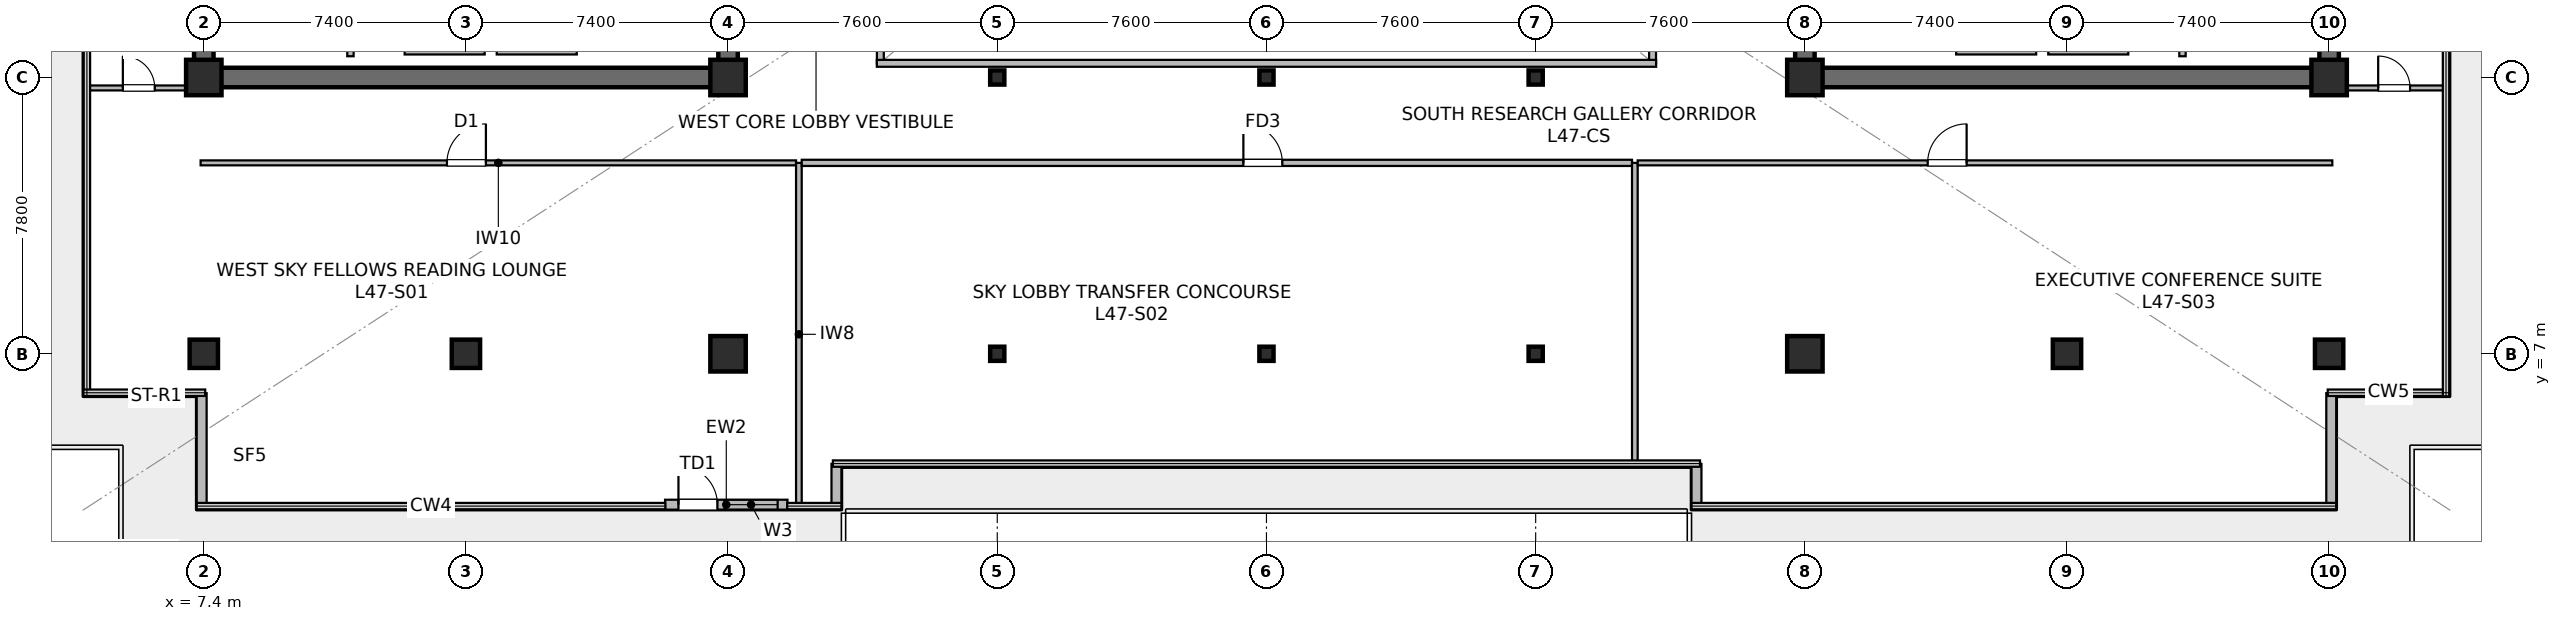
"""IFC4 building model, lengths in metres.
Left out: names, types, materials, properties, quantities, classifications, styles, units other than length and angle.
Written with IfcOpenShell. Run it as: python <this file> out.ifc"""

import sys

from ifc_helpers import new_model, si_unit, direction, frame, frame_2d, origin, origin_2d, place, context, subcontext, project, spatial, rectangle, hollow_rectangle, extrude, source, transform, mapped, element, fill, save


model = new_model("IFC4")
c1 = context("Model", 3, precision=1e-05, world=origin(), true_north=direction((0.0, 1.0)))
c2 = subcontext(c1, "Body", "Model", "MODEL_VIEW")
j1 = project(units=[si_unit("LENGTHUNIT", "METRE"), si_unit("PLANEANGLEUNIT", "RADIAN")], contexts=[c1])
p1 = place(None, origin())
s1 = spatial("IfcSite", under=j1, at=p1, CompositionType="ELEMENT")
p2 = place(p1, origin())
s2 = spatial("IfcBuilding", under=s1, at=p2, CompositionType="ELEMENT")
p3 = place(p2, frame((0.0, 0.0, 196.6)))
s3 = spatial("IfcBuildingStorey", under=s2, at=p3, CompositionType="ELEMENT", Elevation=196.6)
p4 = place(p3, frame((7.125, 14.8, 0.0), z_axis=(0.0, 0.0, 1.0), x_axis=(1.0, 0.0, 0.0)))
e1 = element("IfcWall", 1, at=p4, inside=s3, PredefinedType="SHEAR", context=c2, shape_type="SweptSolid", body=[
    extrude(rectangle(XDim=15.35, YDim=0.55, at=frame_2d((7.675, 0.0))), origin(), (0.0, 0.0, 1.0), 4.5),
])
p5 = place(p3, frame((7.4, 15.075, 0.0), z_axis=(0.0, 0.0, 1.0), x_axis=(0.0, 1.0, 0.0)))
e2 = element("IfcWall", 2, at=p5, inside=s3, PredefinedType="SHEAR", context=c2, shape_type="SweptSolid", body=[
    extrude(rectangle(XDim=18.45, YDim=0.55, at=frame_2d((9.225, 0.0))), origin(), (0.0, 0.0, 1.0), 4.5),
])
p6 = place(p3, frame((22.2, 15.075, 0.0), z_axis=(0.0, 0.0, 1.0), x_axis=(0.0, 1.0, 0.0)))
e3 = element("IfcWall", 3, at=p6, inside=s3, PredefinedType="SHEAR", context=c2, shape_type="SweptSolid", body=[
    extrude(rectangle(XDim=18.45, YDim=0.55, at=frame_2d((9.225, 0.0))), origin(), (0.0, 0.0, 1.0), 4.5),
])
p7 = place(p6, frame((3.475, 0.0, 0.0)))
e4 = element("IfcOpeningElement", 4, at=p7, cuts=e3, PredefinedType="OPENING", context=c2, shape_type="SweptSolid", body=[
    extrude(rectangle(XDim=1.42, YDim=2.2, at=frame_2d((0.71, 1.1))), frame((0.0, 0.285, 0.0), z_axis=(0.0, -1.0, 0.0), x_axis=(1.0, 0.0, 0.0)), (0.0, 0.0, 1.0), 0.57),
])
p8 = place(p3, frame((52.325, 14.8, 0.0), z_axis=(0.0, 0.0, 1.0), x_axis=(1.0, 0.0, 0.0)))
e5 = element("IfcWall", 5, at=p8, inside=s3, PredefinedType="SHEAR", context=c2, shape_type="SweptSolid", body=[
    extrude(rectangle(XDim=15.35, YDim=0.55, at=frame_2d((7.675, 0.0))), origin(), (0.0, 0.0, 1.0), 4.5),
])
p9 = place(p3, frame((52.6, 15.075, 0.0), z_axis=(0.0, 0.0, 1.0), x_axis=(0.0, 1.0, 0.0)))
e6 = element("IfcWall", 6, at=p9, inside=s3, PredefinedType="SHEAR", context=c2, shape_type="SweptSolid", body=[
    extrude(rectangle(XDim=18.45, YDim=0.55, at=frame_2d((9.225, 0.0))), origin(), (0.0, 0.0, 1.0), 4.5),
])
p10 = place(p9, frame((3.475, 0.0, 0.0)))
e7 = element("IfcOpeningElement", 7, at=p10, cuts=e6, PredefinedType="OPENING", context=c2, shape_type="SweptSolid", body=[
    extrude(rectangle(XDim=1.42, YDim=2.2, at=frame_2d((0.71, 1.1))), frame((0.0, 0.285, 0.0), z_axis=(0.0, -1.0, 0.0), x_axis=(1.0, 0.0, 0.0)), (0.0, 0.0, 1.0), 0.57),
])
p11 = place(p3, frame((67.4, 15.075, 0.0), z_axis=(0.0, 0.0, 1.0), x_axis=(0.0, 1.0, 0.0)))
e8 = element("IfcWall", 8, at=p11, inside=s3, PredefinedType="SHEAR", context=c2, shape_type="SweptSolid", body=[
    extrude(rectangle(XDim=18.45, YDim=0.55, at=frame_2d((9.225, 0.0))), origin(), (0.0, 0.0, 1.0), 4.5),
])
m1 = source(origin(), c2, "Body", "SweptSolid", [
    extrude(rectangle(XDim=0.8, YDim=0.8, at=origin_2d()), origin(), (0.0, 0.0, 1.0), 4.8),
])
p12 = place(p3, frame((14.8, 7.0, 0.0), z_axis=(0.0, 0.0, 1.0), x_axis=(1.0, 0.0, 0.0)))
e9 = element("IfcColumn", 9, at=p12, inside=s3, PredefinedType="COLUMN", context=c2, shape_type="MappedRepresentation", body=[
    mapped(m1, transform((0.0, 0.0, 0.0), scale=1.0)),
])
m2 = source(origin(), c2, "Body", "SweptSolid", [
    extrude(rectangle(XDim=1.0, YDim=1.0, at=origin_2d()), origin(), (0.0, 0.0, 1.0), 4.8),
])
for number, where, z_axis, x_axis in (
    (10, (22.2, 7.0, 0.0), (0.0, 0.0, 1.0), (1.0, 0.0, 0.0)),
    (11, (7.4, 14.8, 0.0), (0.0, 0.0, 1.0), (1.0, 0.0, 0.0)),
    (12, (22.2, 14.8, 0.0), (0.0, 0.0, 1.0), (1.0, 0.0, 0.0)),
    (13, (52.6, 7.0, 0.0), (0.0, 0.0, 1.0), (1.0, 0.0, 0.0)),
):
    element("IfcColumn", number, at=place(p3, frame(where, z_axis=z_axis, x_axis=x_axis)), inside=s3, PredefinedType="COLUMN", context=c2, shape_type="MappedRepresentation", body=[
        mapped(m2, transform((0.0, 0.0, 0.0), scale=1.0)),
    ])
p13 = place(p3, frame((60.0, 7.0, 0.0), z_axis=(0.0, 0.0, 1.0), x_axis=(1.0, 0.0, 0.0)))
e14 = element("IfcColumn", 14, at=p13, inside=s3, PredefinedType="COLUMN", context=c2, shape_type="MappedRepresentation", body=[
    mapped(m1, transform((0.0, 0.0, 0.0), scale=1.0)),
])
for number, where, z_axis, x_axis in (
    (15, (52.6, 14.8, 0.0), (0.0, 0.0, 1.0), (1.0, 0.0, 0.0)),
    (16, (67.4, 14.8, 0.0), (0.0, 0.0, 1.0), (1.0, 0.0, 0.0)),
):
    element("IfcColumn", number, at=place(p3, frame(where, z_axis=z_axis, x_axis=x_axis)), inside=s3, PredefinedType="COLUMN", context=c2, shape_type="MappedRepresentation", body=[
        mapped(m2, transform((0.0, 0.0, 0.0), scale=1.0)),
    ])
for number, where, z_axis, x_axis in (
    (17, (7.4, 7.0, 0.0), (0.0, 0.0, 1.0), (1.0, 0.0, 0.0)),
    (18, (67.4, 7.0, 0.0), (0.0, 0.0, 1.0), (1.0, 0.0, 0.0)),
):
    element("IfcColumn", number, at=place(p3, frame(where, z_axis=z_axis, x_axis=x_axis)), inside=s3, PredefinedType="COLUMN", context=c2, shape_type="MappedRepresentation", body=[
        mapped(m1, transform((0.0, 0.0, 0.0), scale=1.0)),
    ])
m3 = source(origin(), c2, "Body", "SweptSolid", [
    extrude(hollow_rectangle(XDim=0.4, YDim=0.4, WallThickness=0.019, at=origin_2d()), origin(), (0.0, 0.0, 1.0), 4.8),
])
for number, where, z_axis, x_axis in (
    (19, (29.8, 7.0, 0.0), (0.0, 0.0, 1.0), (1.0, 0.0, 0.0)),
    (20, (29.8, 14.8, 0.0), (0.0, 0.0, 1.0), (1.0, 0.0, 0.0)),
    (21, (37.4, 7.0, 0.0), (0.0, 0.0, 1.0), (1.0, 0.0, 0.0)),
    (22, (37.4, 14.8, 0.0), (0.0, 0.0, 1.0), (1.0, 0.0, 0.0)),
    (23, (45.0, 7.0, 0.0), (0.0, 0.0, 1.0), (1.0, 0.0, 0.0)),
    (24, (45.0, 14.8, 0.0), (0.0, 0.0, 1.0), (1.0, 0.0, 0.0)),
):
    element("IfcColumn", number, at=place(p3, frame(where, z_axis=z_axis, x_axis=x_axis)), inside=s3, PredefinedType="COLUMN", context=c2, shape_type="MappedRepresentation", body=[
        mapped(m3, transform((0.0, 0.0, 0.0), scale=1.0)),
    ])
p14 = place(p3, frame((20.422, 2.74, 0.0), z_axis=(0.0, 0.0, 1.0), x_axis=(1.0, 0.0, 0.0)))
e25 = element("IfcWall", 25, at=p14, inside=s3, PredefinedType="STANDARD", context=c2, shape_type="SweptSolid", body=[
    extrude(rectangle(XDim=3.456, YDim=0.28, at=frame_2d((1.728, 0.0))), origin(), (0.0, 0.0, 1.0), 4.5),
])
p15 = place(p14, frame((0.378, 0.0, 0.0)))
e26 = element("IfcOpeningElement", 26, at=p15, cuts=e25, PredefinedType="OPENING", context=c2, shape_type="SweptSolid", body=[
    extrude(rectangle(XDim=1.1, YDim=2.2, at=frame_2d((0.55, 1.1))), frame((0.0, 0.15, 0.0), z_axis=(0.0, -1.0, 0.0), x_axis=(1.0, 0.0, 0.0)), (0.0, 0.0, 1.0), 0.3),
])
p16 = place(p14, frame((1.678, 0.0, 0.9)))
e27 = element("IfcOpeningElement", 27, at=p16, cuts=e25, PredefinedType="OPENING", context=c2, shape_type="SweptSolid", body=[
    extrude(rectangle(XDim=1.5, YDim=2.2, at=frame_2d((0.75, 1.1))), frame((0.0, 0.15, 0.0), z_axis=(0.0, -1.0, 0.0), x_axis=(1.0, 0.0, 0.0)), (0.0, 0.0, 1.0), 0.3),
])
for number, where, z_axis, x_axis in (
    (28, (25.26, 2.6, 0.0), (0.0, 0.0, 1.0), (0.0, 1.0, 0.0)),
    (29, (49.54, 3.893, 0.0), (0.0, 0.0, 1.0), (0.0, -1.0, 0.0)),
):
    element("IfcWall", number, at=place(p3, frame(where, z_axis=z_axis, x_axis=x_axis)), inside=s3, PredefinedType="STANDARD", context=c2, shape_type="SweptSolid", body=[
        extrude(rectangle(XDim=1.293, YDim=0.28, at=frame_2d((0.646, 0.0))), origin(), (0.0, 0.0, 1.0), 4.5),
    ])
for number, where, z_axis, x_axis in (
    (30, (67.46, 2.6, 0.0), (0.0, 0.0, 1.0), (0.0, 1.0, 0.0)),
    (31, (7.34, 5.888, 0.0), (0.0, 0.0, 1.0), (0.0, -1.0, 0.0)),
):
    element("IfcWall", number, at=place(p3, frame(where, z_axis=z_axis, x_axis=x_axis)), inside=s3, PredefinedType="STANDARD", context=c2, shape_type="SweptSolid", body=[
        extrude(rectangle(XDim=3.288, YDim=0.28, at=frame_2d((1.644, 0.0))), origin(), (0.0, 0.0, 1.0), 4.5),
    ])
p17 = place(p3, frame((13.07, 15.55, 0.0), z_axis=(0.0, 0.0, 1.0), x_axis=(1.0, 0.0, 0.0)))
e32 = element("IfcWall", 32, at=p17, inside=s3, PredefinedType="SOLIDWALL", context=c2, shape_type="SweptSolid", body=[
    extrude(rectangle(XDim=2.26, YDim=0.2, at=frame_2d((1.13, 0.0))), origin(), (0.0, 0.0, 1.0), 3.897),
])
p18 = place(p3, frame((15.67, 15.55, 0.0), z_axis=(0.0, 0.0, 1.0), x_axis=(1.0, 0.0, 0.0)))
e33 = element("IfcWall", 33, at=p18, inside=s3, PredefinedType="SOLIDWALL", context=c2, shape_type="SweptSolid", body=[
    extrude(rectangle(XDim=2.26, YDim=0.2, at=frame_2d((1.13, 0.0))), origin(), (0.0, 0.0, 1.0), 4.5),
])
p19 = place(p3, frame((11.54, 15.4, 0.0), z_axis=(0.0, 0.0, 1.0), x_axis=(0.0, 1.0, 0.0)))
e34 = element("IfcWall", 34, at=p19, inside=s3, PredefinedType="SOLIDWALL", context=c2, shape_type="SweptSolid", body=[
    extrude(rectangle(XDim=2.4, YDim=0.18, at=frame_2d((1.2, 0.0))), origin(), (0.0, 0.0, 1.0), 4.5),
])
p20 = place(p3, frame((59.47, 15.55, 0.0), z_axis=(0.0, 0.0, 1.0), x_axis=(1.0, 0.0, 0.0)))
e35 = element("IfcWall", 35, at=p20, inside=s3, PredefinedType="SOLIDWALL", context=c2, shape_type="SweptSolid", body=[
    extrude(rectangle(XDim=2.26, YDim=0.2, at=frame_2d((1.13, 0.0))), origin(), (0.0, 0.0, 1.0), 3.897),
])
p21 = place(p3, frame((56.87, 15.55, 0.0), z_axis=(0.0, 0.0, 1.0), x_axis=(1.0, 0.0, 0.0)))
e36 = element("IfcWall", 36, at=p21, inside=s3, PredefinedType="SOLIDWALL", context=c2, shape_type="SweptSolid", body=[
    extrude(rectangle(XDim=2.26, YDim=0.2, at=frame_2d((1.13, 0.0))), origin(), (0.0, 0.0, 1.0), 4.5),
])
p22 = place(p3, frame((63.26, 15.4, 0.0), z_axis=(0.0, 0.0, 1.0), x_axis=(0.0, 1.0, 0.0)))
e37 = element("IfcWall", 37, at=p22, inside=s3, PredefinedType="SOLIDWALL", context=c2, shape_type="SweptSolid", body=[
    extrude(rectangle(XDim=2.4, YDim=0.18, at=frame_2d((1.2, 0.0))), origin(), (0.0, 0.0, 1.0), 4.5),
])
p23 = place(p3, frame((26.5, 15.2, 0.0), z_axis=(0.0, 0.0, 1.0), x_axis=(0.0, 1.0, 0.0)))
e38 = element("IfcWall", 38, at=p23, inside=s3, PredefinedType="SOLIDWALL", context=c2, shape_type="SweptSolid", body=[
    extrude(rectangle(XDim=18.2, YDim=0.195, at=frame_2d((9.1, 0.0))), origin(), (0.0, 0.0, 1.0), 4.5),
])
p24 = place(p23, frame((1.8, 0.0, 0.9)))
e39 = element("IfcOpeningElement", 39, at=p24, cuts=e38, PredefinedType="OPENING", context=c2, shape_type="SweptSolid", body=[
    extrude(rectangle(XDim=1.2, YDim=1.35, at=frame_2d((0.6, 0.675))), frame((0.0, 0.107, 0.0), z_axis=(0.0, -1.0, 0.0), x_axis=(1.0, 0.0, 0.0)), (0.0, 0.0, 1.0), 0.215),
])
p25 = place(p23, frame((13.2, 0.0, 0.9)))
e40 = element("IfcOpeningElement", 40, at=p25, cuts=e38, PredefinedType="OPENING", context=c2, shape_type="SweptSolid", body=[
    extrude(rectangle(XDim=1.2, YDim=1.35, at=frame_2d((0.6, 0.675))), frame((0.0, 0.107, 0.0), z_axis=(0.0, -1.0, 0.0), x_axis=(1.0, 0.0, 0.0)), (0.0, 0.0, 1.0), 0.215),
])
p26 = place(p3, frame((48.3, 15.2, 0.0), z_axis=(0.0, 0.0, 1.0), x_axis=(0.0, 1.0, 0.0)))
e41 = element("IfcWall", 41, at=p26, inside=s3, PredefinedType="SOLIDWALL", context=c2, shape_type="SweptSolid", body=[
    extrude(rectangle(XDim=18.2, YDim=0.195, at=frame_2d((9.1, 0.0))), origin(), (0.0, 0.0, 1.0), 4.5),
])
p27 = place(p26, frame((1.8, 0.0, 0.9)))
e42 = element("IfcOpeningElement", 42, at=p27, cuts=e41, PredefinedType="OPENING", context=c2, shape_type="SweptSolid", body=[
    extrude(rectangle(XDim=1.2, YDim=1.35, at=frame_2d((0.6, 0.675))), frame((0.0, 0.107, 0.0), z_axis=(0.0, -1.0, 0.0), x_axis=(1.0, 0.0, 0.0)), (0.0, 0.0, 1.0), 0.215),
])
p28 = place(p26, frame((13.2, 0.0, 0.9)))
e43 = element("IfcOpeningElement", 43, at=p28, cuts=e41, PredefinedType="OPENING", context=c2, shape_type="SweptSolid", body=[
    extrude(rectangle(XDim=1.2, YDim=1.35, at=frame_2d((0.6, 0.675))), frame((0.0, 0.107, 0.0), z_axis=(0.0, -1.0, 0.0), x_axis=(1.0, 0.0, 0.0)), (0.0, 0.0, 1.0), 0.215),
])
p29 = place(p3, frame((26.4, 15.2, 0.0), z_axis=(0.0, 0.0, 1.0), x_axis=(1.0, 0.0, 0.0)))
e44 = element("IfcWall", 44, at=p29, inside=s3, PredefinedType="SOLIDWALL", context=c2, shape_type="SweptSolid", body=[
    extrude(rectangle(XDim=22.0, YDim=0.195, at=frame_2d((11.0, 0.0))), origin(), (0.0, 0.0, 1.0), 4.5),
])
p30 = place(p3, frame((7.31, 12.39, 0.0), z_axis=(0.0, 0.0, 1.0), x_axis=(1.0, 0.0, 0.0)))
e45 = element("IfcWall", 45, at=p30, inside=s3, PredefinedType="PARTITIONING", context=c2, shape_type="SweptSolid", body=[
    extrude(rectangle(XDim=16.81, YDim=0.14, at=frame_2d((8.405, 0.0))), origin(), (0.0, 0.0, 1.0), 3.897),
])
p31 = place(p30, frame((6.954, 0.0, 0.0)))
e46 = element("IfcOpeningElement", 46, at=p31, cuts=e45, PredefinedType="OPENING", context=c2, shape_type="SweptSolid", body=[
    extrude(rectangle(XDim=1.1, YDim=2.18, at=frame_2d((0.55, 1.09))), frame((0.0, 0.08, 0.0), z_axis=(0.0, -1.0, 0.0), x_axis=(1.0, 0.0, 0.0)), (0.0, 0.0, 1.0), 0.16),
])
p32 = place(p3, frame((24.2, 2.71, 0.0), z_axis=(0.0, 0.0, 1.0), x_axis=(0.0, 1.0, 0.0)))
e47 = element("IfcWall", 47, at=p32, inside=s3, PredefinedType="PARTITIONING", context=c2, shape_type="SweptSolid", body=[
    extrude(rectangle(XDim=9.68, YDim=0.16, at=frame_2d((4.84, 0.0))), origin(), (0.0, 0.0, 1.0), 3.835),
])
p33 = place(p3, frame((24.28, 12.39, 0.0), z_axis=(0.0, 0.0, 1.0), x_axis=(1.0, 0.0, 0.0)))
e48 = element("IfcWall", 48, at=p33, inside=s3, PredefinedType="PARTITIONING", context=c2, shape_type="SweptSolid", body=[
    extrude(rectangle(XDim=23.44, YDim=0.175, at=frame_2d((11.72, 0.0))), origin(), (0.0, 0.0, 1.0), 3.897),
])
p34 = place(p33, frame((12.469, 0.0, 0.0)))
e49 = element("IfcOpeningElement", 49, at=p34, cuts=e48, PredefinedType="OPENING", context=c2, shape_type="SweptSolid", body=[
    extrude(rectangle(XDim=1.1, YDim=2.15, at=frame_2d((0.55, 1.075))), frame((0.0, 0.098, 0.0), z_axis=(0.0, -1.0, 0.0), x_axis=(1.0, 0.0, 0.0)), (0.0, 0.0, 1.0), 0.195),
])
p35 = place(p3, frame((47.8, 3.91, 0.0), z_axis=(0.0, 0.0, 1.0), x_axis=(0.0, 1.0, 0.0)))
e50 = element("IfcWall", 50, at=p35, inside=s3, PredefinedType="PARTITIONING", context=c2, shape_type="SweptSolid", body=[
    extrude(rectangle(XDim=8.48, YDim=0.16, at=frame_2d((4.24, 0.0))), origin(), (0.0, 0.0, 1.0), 3.835),
])
p36 = place(p3, frame((47.88, 12.39, 0.0), z_axis=(0.0, 0.0, 1.0), x_axis=(1.0, 0.0, 0.0)))
e51 = element("IfcWall", 51, at=p36, inside=s3, PredefinedType="PARTITIONING", context=c2, shape_type="SweptSolid", body=[
    extrude(rectangle(XDim=19.61, YDim=0.14, at=frame_2d((9.805, 0.0))), origin(), (0.0, 0.0, 1.0), 3.897),
])
p37 = place(p36, frame((8.186, 0.0, 0.0)))
e52 = element("IfcOpeningElement", 52, at=p37, cuts=e51, PredefinedType="OPENING", context=c2, shape_type="SweptSolid", body=[
    extrude(rectangle(XDim=1.1, YDim=2.18, at=frame_2d((0.55, 1.09))), frame((0.0, 0.08, 0.0), z_axis=(0.0, -1.0, 0.0), x_axis=(1.0, 0.0, 0.0)), (0.0, 0.0, 1.0), 0.16),
])
p38 = place(p3, frame((4.11, 14.505, 0.0), z_axis=(0.0, 0.0, 1.0), x_axis=(1.0, 0.0, 0.0)))
e53 = element("IfcWall", 53, at=p38, inside=s3, PredefinedType="PARTITIONING", context=c2, shape_type="SweptSolid", body=[
    extrude(rectangle(XDim=2.91, YDim=0.14, at=frame_2d((1.455, 0.0))), origin(), (0.0, 0.0, 1.0), 4.5),
])
p39 = place(p38, frame((1.005, 0.0, 0.0)))
e54 = element("IfcOpeningElement", 54, at=p39, cuts=e53, PredefinedType="OPENING", context=c2, shape_type="SweptSolid", body=[
    extrude(rectangle(XDim=0.9, YDim=2.1, at=frame_2d((0.45, 1.05))), frame((0.0, 0.08, 0.0), z_axis=(0.0, -1.0, 0.0), x_axis=(1.0, 0.0, 0.0)), (0.0, 0.0, 1.0), 0.16),
])
p40 = place(p3, frame((67.78, 14.505, 0.0), z_axis=(0.0, 0.0, 1.0), x_axis=(1.0, 0.0, 0.0)))
e55 = element("IfcWall", 55, at=p40, inside=s3, PredefinedType="PARTITIONING", context=c2, shape_type="SweptSolid", body=[
    extrude(rectangle(XDim=2.91, YDim=0.14, at=frame_2d((1.455, 0.0))), origin(), (0.0, 0.0, 1.0), 4.5),
])
p41 = place(p40, frame((1.005, 0.0, 0.0)))
e56 = element("IfcOpeningElement", 56, at=p41, cuts=e55, PredefinedType="OPENING", context=c2, shape_type="SweptSolid", body=[
    extrude(rectangle(XDim=0.9, YDim=2.1, at=frame_2d((0.45, 1.05))), frame((0.0, 0.08, 0.0), z_axis=(0.0, -1.0, 0.0), x_axis=(1.0, 0.0, 0.0)), (0.0, 0.0, 1.0), 0.16),
])
m4 = source(origin(), c2, "Body", "SweptSolid", [
    extrude(rectangle(XDim=1.1, YDim=2.2, at=frame_2d((0.55, 1.1))), frame((0.0, 0.025, 0.0), z_axis=(0.0, -1.0, 0.0), x_axis=(1.0, 0.0, 0.0)), (0.0, 0.0, 1.0), 0.05),
])
p42 = place(p15, origin())
e57 = element("IfcDoor", 57, at=p42, inside=s3, OperationType="SINGLE_SWING_LEFT", PredefinedType="DOOR", context=c2, shape_type="MappedRepresentation", body=[
    mapped(m4, transform((0.0, 0.0, 0.0), scale=1.0)),
])
fill(e26, e57)
m5 = source(origin(), c2, "Body", "SweptSolid", [
    extrude(rectangle(XDim=1.5, YDim=2.2, at=frame_2d((0.75, 1.1))), frame((0.0, 0.03, 0.0), z_axis=(0.0, -1.0, 0.0), x_axis=(1.0, 0.0, 0.0)), (0.0, 0.0, 1.0), 0.06),
])
p43 = place(p16, origin())
e58 = element("IfcWindow", 58, at=p43, inside=s3, PartitioningType="SINGLE_PANEL", PredefinedType="WINDOW", context=c2, shape_type="MappedRepresentation", body=[
    mapped(m5, transform((0.0, 0.0, 0.0), scale=1.0)),
])
fill(e27, e58)
m6 = source(origin(), c2, "Body", "SweptSolid", [
    extrude(rectangle(XDim=1.1, YDim=2.18, at=frame_2d((0.55, 1.09))), frame((0.0, 0.025, 0.0), z_axis=(0.0, -1.0, 0.0), x_axis=(1.0, 0.0, 0.0)), (0.0, 0.0, 1.0), 0.05),
])
p44 = place(p31, origin())
e59 = element("IfcDoor", 59, at=p44, inside=s3, OperationType="SINGLE_SWING_RIGHT", PredefinedType="DOOR", context=c2, shape_type="MappedRepresentation", body=[
    mapped(m6, transform((0.0, 0.0, 0.0), scale=1.0)),
])
fill(e46, e59)
m7 = source(origin(), c2, "Body", "SweptSolid", [
    extrude(rectangle(XDim=1.1, YDim=2.15, at=frame_2d((0.55, 1.075))), frame((0.0, 0.025, 0.0), z_axis=(0.0, -1.0, 0.0), x_axis=(1.0, 0.0, 0.0)), (0.0, 0.0, 1.0), 0.05),
])
p45 = place(p34, origin())
e60 = element("IfcDoor", 60, at=p45, inside=s3, OperationType="SINGLE_SWING_LEFT", PredefinedType="DOOR", context=c2, shape_type="MappedRepresentation", body=[
    mapped(m7, transform((0.0, 0.0, 0.0), scale=1.0)),
])
fill(e49, e60)
p46 = place(p37, origin())
e61 = element("IfcDoor", 61, at=p46, inside=s3, OperationType="SINGLE_SWING_RIGHT", PredefinedType="DOOR", context=c2, shape_type="MappedRepresentation", body=[
    mapped(m6, transform((0.0, 0.0, 0.0), scale=1.0)),
])
fill(e52, e61)
m8 = source(origin(), c2, "Body", "SweptSolid", [
    extrude(rectangle(XDim=0.9, YDim=2.1, at=frame_2d((0.45, 1.05))), frame((0.0, 0.025, 0.0), z_axis=(0.0, -1.0, 0.0), x_axis=(1.0, 0.0, 0.0)), (0.0, 0.0, 1.0), 0.05),
])
p47 = place(p39, origin())
e62 = element("IfcDoor", 62, at=p47, inside=s3, OperationType="SINGLE_SWING_LEFT", PredefinedType="DOOR", context=c2, shape_type="MappedRepresentation", body=[
    mapped(m8, transform((0.0, 0.0, 0.0), scale=1.0)),
])
fill(e54, e62)
p48 = place(p41, origin())
e63 = element("IfcDoor", 63, at=p48, inside=s3, OperationType="SINGLE_SWING_LEFT", PredefinedType="DOOR", context=c2, shape_type="MappedRepresentation", body=[
    mapped(m8, transform((0.0, 0.0, 0.0), scale=1.0)),
])
fill(e56, e63)
save(model, sys.argv[1])
